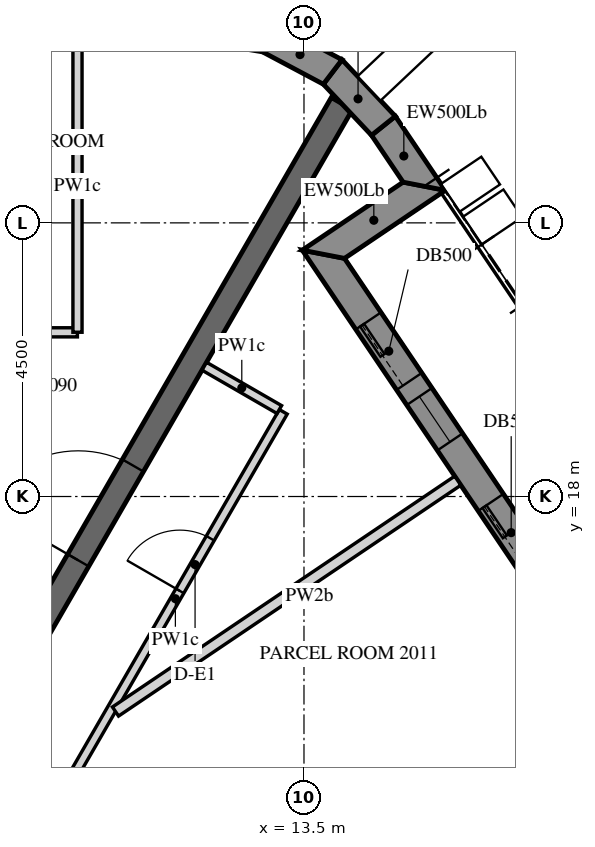
"""IFC4 building model, lengths in metres.
Left out: names, types, materials, properties, quantities, classifications, styles, units other than length and angle.
Written with IfcOpenShell. Run it as: python <this file> out.ifc"""

import sys

from ifc_helpers import new_model, si_unit, direction, frame, frame_2d, origin, place, context, subcontext, project, spatial, polyline, rectangle, outline, extrude, element, fill, save


model = new_model("IFC4")
c1 = context("Model", 3, precision=1e-05, world=origin(), true_north=direction((0.0, 1.0)))
c2 = subcontext(c1, "Body", "Model", "MODEL_VIEW")
j1 = project(units=[si_unit("LENGTHUNIT", "METRE"), si_unit("PLANEANGLEUNIT", "RADIAN")], contexts=[c1])
p1 = place(None, origin())
s1 = spatial("IfcSite", under=j1, at=p1, CompositionType="ELEMENT")
p2 = place(p1, origin())
s2 = spatial("IfcBuilding", under=s1, at=p2, CompositionType="ELEMENT")
p3 = place(p2, frame((0.0, 0.0, 256.2)))
s3 = spatial("IfcBuildingStorey", under=s2, at=p3, CompositionType="ELEMENT", Elevation=256.2)
p4 = place(p3, frame((26.706, 2.879, 0.0), z_axis=(0.0, 0.0, 1.0), x_axis=(-0.559197891507, 0.829034208061, 0.0)))
e1 = element("IfcWall", 1, at=p4, inside=s3, PredefinedType="SOLIDWALL", context=c2, shape_type="SweptSolid", body=[
    extrude(outline(polyline([(0.25, -0.25), (22.795, -0.25), (23.295, 0.25), (-0.25, 0.25), (0.25, -0.25)])), origin(), (0.0, 0.0, 1.0), 3.75),
])
p5 = place(p4, frame((1.323, 0.0, 0.9)))
e2 = element("IfcOpeningElement", 2, at=p5, cuts=e1, PredefinedType="OPENING", context=c2, shape_type="SweptSolid", body=[
    extrude(rectangle(XDim=0.9, YDim=1.5, at=frame_2d((0.45, 0.75))), frame((0.0, 0.26, 0.0), z_axis=(0.0, -1.0, 0.0), x_axis=(1.0, 0.0, 0.0)), (0.0, 0.0, 1.0), 0.52),
])
p6 = place(p4, frame((2.522, 0.0, 0.0)))
e3 = element("IfcOpeningElement", 3, at=p6, cuts=e1, PredefinedType="OPENING", context=c2, shape_type="SweptSolid", body=[
    extrude(rectangle(XDim=1.2, YDim=2.4, at=frame_2d((0.6, 1.2))), frame((0.0, 0.26, 0.0), z_axis=(0.0, -1.0, 0.0), x_axis=(1.0, 0.0, 0.0)), (0.0, 0.0, 1.0), 0.52),
])
p7 = place(p4, frame((4.922, 0.0, 0.9)))
e4 = element("IfcOpeningElement", 4, at=p7, cuts=e1, PredefinedType="OPENING", context=c2, shape_type="SweptSolid", body=[
    extrude(rectangle(XDim=0.9, YDim=1.5, at=frame_2d((0.45, 0.75))), frame((0.0, 0.26, 0.0), z_axis=(0.0, -1.0, 0.0), x_axis=(1.0, 0.0, 0.0)), (0.0, 0.0, 1.0), 0.52),
])
p8 = place(p4, frame((6.122, 0.0, 0.0)))
e5 = element("IfcOpeningElement", 5, at=p8, cuts=e1, PredefinedType="OPENING", context=c2, shape_type="SweptSolid", body=[
    extrude(rectangle(XDim=1.2, YDim=2.4, at=frame_2d((0.6, 1.2))), frame((0.0, 0.26, 0.0), z_axis=(0.0, -1.0, 0.0), x_axis=(1.0, 0.0, 0.0)), (0.0, 0.0, 1.0), 0.52),
])
p9 = place(p4, frame((8.522, 0.0, 0.9)))
e6 = element("IfcOpeningElement", 6, at=p9, cuts=e1, PredefinedType="OPENING", context=c2, shape_type="SweptSolid", body=[
    extrude(rectangle(XDim=0.9, YDim=1.5, at=frame_2d((0.45, 0.75))), frame((0.0, 0.26, 0.0), z_axis=(0.0, -1.0, 0.0), x_axis=(1.0, 0.0, 0.0)), (0.0, 0.0, 1.0), 0.52),
])
p10 = place(p4, frame((9.722, 0.0, 0.0)))
e7 = element("IfcOpeningElement", 7, at=p10, cuts=e1, PredefinedType="OPENING", context=c2, shape_type="SweptSolid", body=[
    extrude(rectangle(XDim=1.2, YDim=2.4, at=frame_2d((0.6, 1.2))), frame((0.0, 0.26, 0.0), z_axis=(0.0, -1.0, 0.0), x_axis=(1.0, 0.0, 0.0)), (0.0, 0.0, 1.0), 0.52),
])
p11 = place(p4, frame((12.122, 0.0, 0.9)))
e8 = element("IfcOpeningElement", 8, at=p11, cuts=e1, PredefinedType="OPENING", context=c2, shape_type="SweptSolid", body=[
    extrude(rectangle(XDim=0.9, YDim=1.5, at=frame_2d((0.45, 0.75))), frame((0.0, 0.26, 0.0), z_axis=(0.0, -1.0, 0.0), x_axis=(1.0, 0.0, 0.0)), (0.0, 0.0, 1.0), 0.52),
])
p12 = place(p4, frame((13.323, 0.0, 0.0)))
e9 = element("IfcOpeningElement", 9, at=p12, cuts=e1, PredefinedType="OPENING", context=c2, shape_type="SweptSolid", body=[
    extrude(rectangle(XDim=1.2, YDim=2.4, at=frame_2d((0.6, 1.2))), frame((0.0, 0.26, 0.0), z_axis=(0.0, -1.0, 0.0), x_axis=(1.0, 0.0, 0.0)), (0.0, 0.0, 1.0), 0.52),
])
p13 = place(p4, frame((15.722, 0.0, 0.9)))
e10 = element("IfcOpeningElement", 10, at=p13, cuts=e1, PredefinedType="OPENING", context=c2, shape_type="SweptSolid", body=[
    extrude(rectangle(XDim=0.9, YDim=1.5, at=frame_2d((0.45, 0.75))), frame((0.0, 0.26, 0.0), z_axis=(0.0, -1.0, 0.0), x_axis=(1.0, 0.0, 0.0)), (0.0, 0.0, 1.0), 0.52),
])
p14 = place(p4, frame((16.922, 0.0, 0.0)))
e11 = element("IfcOpeningElement", 11, at=p14, cuts=e1, PredefinedType="OPENING", context=c2, shape_type="SweptSolid", body=[
    extrude(rectangle(XDim=1.2, YDim=2.4, at=frame_2d((0.6, 1.2))), frame((0.0, 0.26, 0.0), z_axis=(0.0, -1.0, 0.0), x_axis=(1.0, 0.0, 0.0)), (0.0, 0.0, 1.0), 0.52),
])
p15 = place(p4, frame((19.323, 0.0, 0.9)))
e12 = element("IfcOpeningElement", 12, at=p15, cuts=e1, PredefinedType="OPENING", context=c2, shape_type="SweptSolid", body=[
    extrude(rectangle(XDim=0.9, YDim=1.5, at=frame_2d((0.45, 0.75))), frame((0.0, 0.26, 0.0), z_axis=(0.0, -1.0, 0.0), x_axis=(1.0, 0.0, 0.0)), (0.0, 0.0, 1.0), 0.52),
])
p16 = place(p4, frame((20.522, 0.0, 0.0)))
e13 = element("IfcOpeningElement", 13, at=p16, cuts=e1, PredefinedType="OPENING", context=c2, shape_type="SweptSolid", body=[
    extrude(rectangle(XDim=1.2, YDim=2.4, at=frame_2d((0.6, 1.2))), frame((0.0, 0.26, 0.0), z_axis=(0.0, -1.0, 0.0), x_axis=(1.0, 0.0, 0.0)), (0.0, 0.0, 1.0), 0.52),
])
p17 = place(p3, frame((13.819, 21.984, 0.0), z_axis=(0.0, 0.0, 1.0), x_axis=(0.829052389485, 0.559170935841, 0.0)))
e14 = element("IfcWall", 14, at=p17, inside=s3, PredefinedType="SOLIDWALL", context=c2, shape_type="SweptSolid", body=[
    extrude(outline(polyline([(0.25, -0.25), (2.25, -0.25), (1.75, 0.25), (-0.25, 0.25), (0.25, -0.25)])), origin(), (0.0, 0.0, 1.0), 3.75),
])
p18 = place(p3, frame((15.478, 23.102, 0.0), z_axis=(0.0, 0.0, 1.0), x_axis=(-0.559245726333, 0.829001940636, 0.0)))
e15 = element("IfcWall", 15, at=p18, inside=s3, PredefinedType="SOLIDWALL", context=c2, shape_type="SweptSolid", body=[
    extrude(outline(polyline([(-0.25, -0.25), (1.221, -0.25), (1.18, 0.25), (0.25, 0.25), (-0.25, -0.25)])), origin(), (0.0, 0.0, 1.0), 3.75),
])
p19 = place(p3, frame((14.806, 24.097, 0.0), z_axis=(0.0, 0.0, 1.0), x_axis=(-0.686234452793, 0.727380420275, 0.0)))
e16 = element("IfcWall", 16, at=p19, inside=s3, PredefinedType="SOLIDWALL", context=c2, shape_type="SweptSolid", body=[
    extrude(outline(polyline([(-0.021, -0.25), (1.257, -0.25), (1.175, 0.25), (0.021, 0.25), (-0.021, -0.25)])), origin(), (0.0, 0.0, 1.0), 3.75),
])
p20 = place(p3, frame((13.972, 24.982, 0.0), z_axis=(0.0, 0.0, 1.0), x_axis=(-0.882902492938, 0.469556373575, 0.0)))
e17 = element("IfcWall", 17, at=p20, inside=s3, PredefinedType="SOLIDWALL", context=c2, shape_type="SweptSolid", body=[
    extrude(outline(polyline([(-0.041, -0.25), (1.257, -0.25), (1.175, 0.25), (0.041, 0.25), (-0.041, -0.25)])), origin(), (0.0, 0.0, 1.0), 3.75),
])
p21 = place(p3, frame((6.351, 11.0, 0.0), z_axis=(0.0, 0.0, 1.0), x_axis=(0.499998894578, 0.866026041999, 0.0)))
e18 = element("IfcWall", 18, at=p21, inside=s3, PredefinedType="SHEAR", context=c2, shape_type="SweptSolid", body=[
    extrude(rectangle(XDim=15.544, YDim=0.4, at=frame_2d((7.772, 0.0))), origin(), (0.0, 0.0, 1.0), 3.75),
])
p22 = place(p21, frame((6.872, 0.0, 0.0)))
e19 = element("IfcOpeningElement", 19, at=p22, cuts=e18, PredefinedType="OPENING", context=c2, shape_type="SweptSolid", body=[
    extrude(rectangle(XDim=1.8, YDim=2.4, at=frame_2d((0.9, 1.2))), frame((0.0, 0.21, 0.0), z_axis=(0.0, -1.0, 0.0), x_axis=(1.0, 0.0, 0.0)), (0.0, 0.0, 1.0), 0.42),
])
p23 = place(p3, frame((9.774, 20.7, 0.0), z_axis=(0.0, 0.0, 1.0), x_axis=(-1.0, 0.0, 0.0)))
e20 = element("IfcWall", 20, at=p23, inside=s3, PredefinedType="PARTITIONING", context=c2, shape_type="SweptSolid", body=[
    extrude(rectangle(XDim=2.916, YDim=0.15, at=frame_2d((1.458, 0.0))), origin(), (0.0, 0.0, 1.0), 2.823),
])
p24 = place(p3, frame((9.775, 25.5, 0.0), z_axis=(0.0, 0.0, 1.0), x_axis=(0.0, -1.0, 0.0)))
e21 = element("IfcWall", 21, at=p24, inside=s3, PredefinedType="PARTITIONING", context=c2, shape_type="SweptSolid", body=[
    extrude(rectangle(XDim=4.799, YDim=0.15, at=frame_2d((2.399, 0.0))), origin(), (0.0, 0.0, 1.0), 2.823),
])
p25 = place(p3, frame((9.611, 13.246, 0.0), z_axis=(0.0, 0.0, 1.0), x_axis=(0.499994435258, 0.866028616566, 0.0)))
e22 = element("IfcWall", 22, at=p25, inside=s3, PredefinedType="PARTITIONING", context=c2, shape_type="SweptSolid", body=[
    extrude(rectangle(XDim=7.097, YDim=0.15, at=frame_2d((3.548, 0.0))), origin(), (0.0, 0.0, 1.0), 2.823),
])
p26 = place(p25, frame((3.696, 0.0, 0.0)))
e23 = element("IfcOpeningElement", 23, at=p26, cuts=e22, PredefinedType="OPENING", context=c2, shape_type="SweptSolid", body=[
    extrude(rectangle(XDim=1.0, YDim=2.1, at=frame_2d((0.5, 1.05))), frame((0.0, 0.085, 0.0), z_axis=(0.0, -1.0, 0.0), x_axis=(1.0, 0.0, 0.0)), (0.0, 0.0, 1.0), 0.17),
])
p27 = place(p3, frame((13.094, 19.43, 0.0), z_axis=(0.0, 0.0, 1.0), x_axis=(-0.866062911188, 0.499935029643, 0.0)))
e24 = element("IfcWall", 24, at=p27, inside=s3, PredefinedType="PARTITIONING", context=c2, shape_type="SweptSolid", body=[
    extrude(rectangle(XDim=1.425, YDim=0.15, at=frame_2d((0.712, 0.0))), origin(), (0.0, 0.0, 1.0), 2.823),
])
p28 = place(p3, frame((16.029, 18.26, 0.0), z_axis=(0.0, 0.0, 1.0), x_axis=(-0.82904538001, -0.559181328268, 0.0)))
e25 = element("IfcWall", 25, at=p28, inside=s3, PredefinedType="PARTITIONING", context=c2, shape_type="SweptSolid", body=[
    extrude(rectangle(XDim=6.79, YDim=0.18, at=frame_2d((3.395, 0.0))), origin(), (0.0, 0.0, 1.0), 2.823),
])
p29 = place(p14, frame((0.0, 0.175, 0.0)))
e26 = element("IfcDoor", 26, at=p29, inside=s3, OperationType="SLIDING_TO_LEFT", PredefinedType="DOOR", context=c2, shape_type="SweptSolid", body=[
    extrude(rectangle(XDim=1.2, YDim=2.4, at=frame_2d((0.6, 1.2))), frame((0.0, 0.025, 0.0), z_axis=(0.0, -1.0, 0.0), x_axis=(1.0, 0.0, 0.0)), (0.0, 0.0, 1.0), 0.05),
])
fill(e11, e26)
p30 = place(p15, frame((0.0, 0.18, 0.0)))
e27 = element("IfcWindow", 27, at=p30, inside=s3, PartitioningType="SINGLE_PANEL", PredefinedType="WINDOW", context=c2, shape_type="SweptSolid", body=[
    extrude(rectangle(XDim=0.9, YDim=1.5, at=frame_2d((0.45, 0.75))), frame((0.0, 0.03, 0.0), z_axis=(0.0, -1.0, 0.0), x_axis=(1.0, 0.0, 0.0)), (0.0, 0.0, 1.0), 0.06),
])
fill(e12, e27)
p31 = place(p16, frame((0.0, 0.175, 0.0)))
e28 = element("IfcDoor", 28, at=p31, inside=s3, OperationType="SLIDING_TO_LEFT", PredefinedType="DOOR", context=c2, shape_type="SweptSolid", body=[
    extrude(rectangle(XDim=1.2, YDim=2.4, at=frame_2d((0.6, 1.2))), frame((0.0, 0.025, 0.0), z_axis=(0.0, -1.0, 0.0), x_axis=(1.0, 0.0, 0.0)), (0.0, 0.0, 1.0), 0.05),
])
fill(e13, e28)
p32 = place(p22, origin())
e29 = element("IfcDoor", 29, at=p32, inside=s3, OperationType="DOUBLE_DOOR_SINGLE_SWING", PredefinedType="DOOR", context=c2, shape_type="SweptSolid", body=[
    extrude(rectangle(XDim=1.8, YDim=2.4, at=frame_2d((0.9, 1.2))), frame((0.0, 0.025, 0.0), z_axis=(0.0, -1.0, 0.0), x_axis=(1.0, 0.0, 0.0)), (0.0, 0.0, 1.0), 0.05),
])
fill(e19, e29)
p33 = place(p26, origin())
e30 = element("IfcDoor", 30, at=p33, inside=s3, OperationType="SINGLE_SWING_RIGHT", PredefinedType="DOOR", context=c2, shape_type="SweptSolid", body=[
    extrude(rectangle(XDim=1.0, YDim=2.1, at=frame_2d((0.5, 1.05))), frame((0.0, 0.025, 0.0), z_axis=(0.0, -1.0, 0.0), x_axis=(1.0, 0.0, 0.0)), (0.0, 0.0, 1.0), 0.05),
])
fill(e23, e30)
save(model, sys.argv[1])
